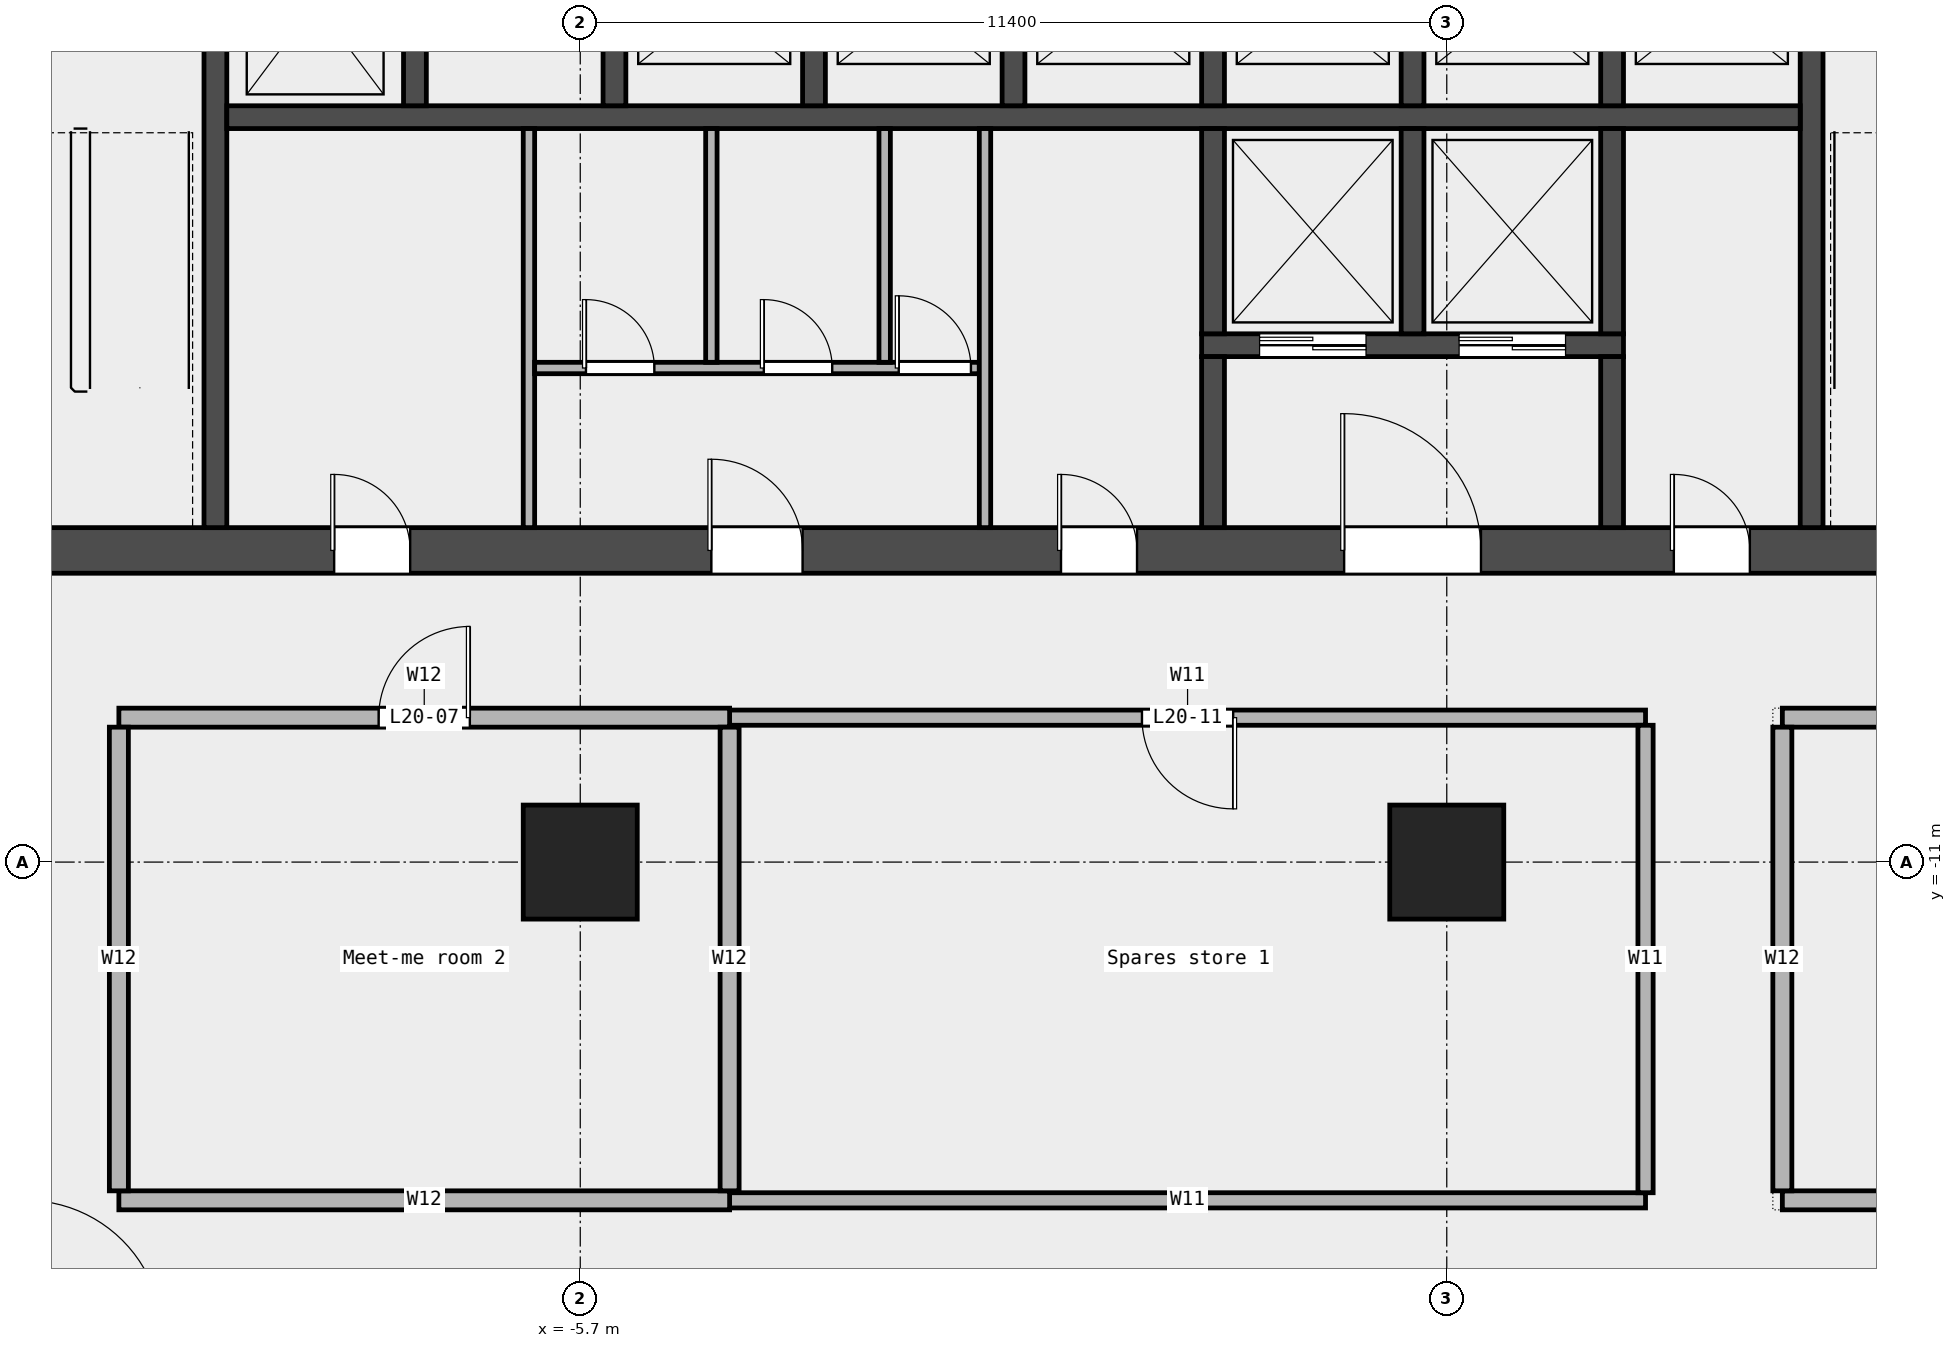
"""IFC4 building model, lengths in metres.
Left out: names, types, materials, properties, quantities, classifications, styles, units other than length and angle.
Written with IfcOpenShell. Run it as: python <this file> out.ifc"""

import sys

from ifc_helpers import new_model, si_unit, direction, frame, frame_2d, origin, origin_2d, place, context, subcontext, project, spatial, rectangle, extrude, element, fill, save


model = new_model("IFC4")
c1 = context("Model", 3, precision=1e-05, world=origin(), true_north=direction((0.0, 1.0)))
c2 = subcontext(c1, "Body", "Model", "MODEL_VIEW")
j1 = project(units=[si_unit("LENGTHUNIT", "METRE"), si_unit("PLANEANGLEUNIT", "RADIAN")], contexts=[c1])
p1 = place(None, origin())
s1 = spatial("IfcSite", under=j1, at=p1, CompositionType="ELEMENT")
p2 = place(p1, origin())
s2 = spatial("IfcBuilding", under=s1, at=p2, CompositionType="ELEMENT")
p3 = place(p2, frame((0.0, 0.0, 103.6)))
s3 = spatial("IfcBuildingStorey", under=s2, at=p3, CompositionType="ELEMENT", Elevation=103.6)
for number, where, z_axis, x_axis in (
    (1, (-5.7, -11.0, 0.0), (0.0, 0.0, 1.0), (1.0, 0.0, 0.0)),
    (2, (5.7, -11.0, 0.0), (0.0, 0.0, 1.0), (1.0, 0.0, 0.0)),
):
    element("IfcColumn", number, at=place(p3, frame(where, z_axis=z_axis, x_axis=x_axis)), inside=s3, PredefinedType="COLUMN", context=c2, shape_type="SweptSolid", body=[
        extrude(rectangle(XDim=1.5, YDim=1.5, at=origin_2d()), origin(), (0.0, 0.0, 1.0), 4.05),
    ])
p4 = place(p3, frame((-3.735, -15.45, 0.0), z_axis=(0.0, 0.0, 1.0), x_axis=(1.0, 0.0, 0.0)))
e3 = element("IfcWall", 3, at=p4, inside=s3, PredefinedType="PARTITIONING", context=c2, shape_type="SweptSolid", body=[
    extrude(rectangle(XDim=12.05, YDim=0.2, at=frame_2d((6.025, 0.0))), origin(), (0.0, 0.0, 1.0), 4.05),
])
p5 = place(p3, frame((-11.77, -15.45, 0.0), z_axis=(0.0, 0.0, 1.0), x_axis=(1.0, 0.0, 0.0)))
e4 = element("IfcWall", 4, at=p5, inside=s3, PredefinedType="PARTITIONING", context=c2, shape_type="SweptSolid", body=[
    extrude(rectangle(XDim=8.035, YDim=0.25, at=frame_2d((4.018, 0.0))), origin(), (0.0, 0.0, 1.0), 4.05),
])
p6 = place(p3, frame((10.115, -15.45, 0.0), z_axis=(0.0, 0.0, 1.0), x_axis=(1.0, 0.0, 0.0)))
e5 = element("IfcWall", 5, at=p6, inside=s3, PredefinedType="PARTITIONING", context=c2, shape_type="SweptSolid", body=[
    extrude(rectangle(XDim=18.885, YDim=0.25, at=frame_2d((9.442, 0.0))), origin(), (0.0, 0.0, 1.0), 4.05),
])
p7 = place(p6, frame((8.742, 0.0, 0.0)))
e6 = element("IfcOpeningElement", 6, at=p7, cuts=e5, PredefinedType="OPENING", context=c2, shape_type="SweptSolid", body=[
    extrude(rectangle(XDim=1.2, YDim=2.1, at=frame_2d((0.6, 1.05))), frame((0.0, 0.137, 0.0), z_axis=(0.0, -1.0, 0.0), x_axis=(1.0, 0.0, 0.0)), (0.0, 0.0, 1.0), 0.274),
])
p8 = place(p3, frame((-3.735, -9.1, 0.0), z_axis=(0.0, 0.0, 1.0), x_axis=(1.0, 0.0, 0.0)))
e7 = element("IfcWall", 7, at=p8, inside=s3, PredefinedType="PARTITIONING", context=c2, shape_type="SweptSolid", body=[
    extrude(rectangle(XDim=12.05, YDim=0.2, at=frame_2d((6.025, 0.0))), origin(), (0.0, 0.0, 1.0), 4.05),
])
p9 = place(p8, frame((5.425, 0.0, 0.0)))
e8 = element("IfcOpeningElement", 8, at=p9, cuts=e7, PredefinedType="OPENING", context=c2, shape_type="SweptSolid", body=[
    extrude(rectangle(XDim=1.2, YDim=2.1, at=frame_2d((0.6, 1.05))), frame((0.0, 0.112, 0.0), z_axis=(0.0, -1.0, 0.0), x_axis=(1.0, 0.0, 0.0)), (0.0, 0.0, 1.0), 0.224),
])
p10 = place(p3, frame((-11.77, -9.1, 0.0), z_axis=(0.0, 0.0, 1.0), x_axis=(1.0, 0.0, 0.0)))
e9 = element("IfcWall", 9, at=p10, inside=s3, PredefinedType="PARTITIONING", context=c2, shape_type="SweptSolid", body=[
    extrude(rectangle(XDim=8.035, YDim=0.25, at=frame_2d((4.018, 0.0))), origin(), (0.0, 0.0, 1.0), 4.05),
])
p11 = place(p10, frame((3.417, 0.0, 0.0)))
e10 = element("IfcOpeningElement", 10, at=p11, cuts=e9, PredefinedType="OPENING", context=c2, shape_type="SweptSolid", body=[
    extrude(rectangle(XDim=1.2, YDim=2.1, at=frame_2d((0.6, 1.05))), frame((0.0, 0.137, 0.0), z_axis=(0.0, -1.0, 0.0), x_axis=(1.0, 0.0, 0.0)), (0.0, 0.0, 1.0), 0.274),
])
p12 = place(p3, frame((10.115, -9.1, 0.0), z_axis=(0.0, 0.0, 1.0), x_axis=(1.0, 0.0, 0.0)))
e11 = element("IfcWall", 11, at=p12, inside=s3, PredefinedType="PARTITIONING", context=c2, shape_type="SweptSolid", body=[
    extrude(rectangle(XDim=18.885, YDim=0.25, at=frame_2d((9.442, 0.0))), origin(), (0.0, 0.0, 1.0), 4.05),
])
for number, where, z_axis, x_axis in (
    (12, (-11.77, -15.325, 0.0), (0.0, 0.0, 1.0), (0.0, 1.0, 0.0)),
    (13, (-3.735, -15.325, 0.0), (0.0, 0.0, 1.0), (0.0, 1.0, 0.0)),
):
    element("IfcWall", number, at=place(p3, frame(where, z_axis=z_axis, x_axis=x_axis)), inside=s3, PredefinedType="PARTITIONING", context=c2, shape_type="SweptSolid", body=[
        extrude(rectangle(XDim=6.1, YDim=0.25, at=frame_2d((3.05, 0.0))), origin(), (0.0, 0.0, 1.0), 4.05),
    ])
p13 = place(p3, frame((8.315, -15.35, 0.0), z_axis=(0.0, 0.0, 1.0), x_axis=(0.0, 1.0, 0.0)))
e14 = element("IfcWall", 14, at=p13, inside=s3, PredefinedType="PARTITIONING", context=c2, shape_type="SweptSolid", body=[
    extrude(rectangle(XDim=6.15, YDim=0.2, at=frame_2d((3.075, 0.0))), origin(), (0.0, 0.0, 1.0), 4.05),
])
p14 = place(p3, frame((10.115, -15.325, 0.0), z_axis=(0.0, 0.0, 1.0), x_axis=(0.0, 1.0, 0.0)))
e15 = element("IfcWall", 15, at=p14, inside=s3, PredefinedType="PARTITIONING", context=c2, shape_type="SweptSolid", body=[
    extrude(rectangle(XDim=6.1, YDim=0.25, at=frame_2d((3.05, 0.0))), origin(), (0.0, 0.0, 1.0), 4.05),
])
p15 = place(p3, frame((-14.4, -6.9, 0.0), z_axis=(0.0, 0.0, 1.0), x_axis=(1.0, 0.0, 0.0)))
e16 = element("IfcWall", 16, at=p15, inside=s3, PredefinedType="SHEAR", context=c2, shape_type="SweptSolid", body=[
    extrude(rectangle(XDim=28.8, YDim=0.6, at=frame_2d((14.4, 0.0))), origin(), (0.0, 0.0, 1.0), 4.2),
])
p16 = place(p15, frame((5.462, 0.0, 0.0)))
e17 = element("IfcOpeningElement", 17, at=p16, cuts=e16, PredefinedType="OPENING", context=c2, shape_type="SweptSolid", body=[
    extrude(rectangle(XDim=1.0, YDim=2.1, at=frame_2d((0.5, 1.05))), frame((0.0, 0.312, 0.0), z_axis=(0.0, -1.0, 0.0), x_axis=(1.0, 0.0, 0.0)), (0.0, 0.0, 1.0), 0.624),
])
p17 = place(p15, frame((10.425, 0.0, 0.0)))
e18 = element("IfcOpeningElement", 18, at=p17, cuts=e16, PredefinedType="OPENING", context=c2, shape_type="SweptSolid", body=[
    extrude(rectangle(XDim=1.2, YDim=2.1, at=frame_2d((0.6, 1.05))), frame((0.0, 0.312, 0.0), z_axis=(0.0, -1.0, 0.0), x_axis=(1.0, 0.0, 0.0)), (0.0, 0.0, 1.0), 0.624),
])
p18 = place(p15, frame((15.025, 0.0, 0.0)))
e19 = element("IfcOpeningElement", 19, at=p18, cuts=e16, PredefinedType="OPENING", context=c2, shape_type="SweptSolid", body=[
    extrude(rectangle(XDim=1.0, YDim=2.1, at=frame_2d((0.5, 1.05))), frame((0.0, 0.312, 0.0), z_axis=(0.0, -1.0, 0.0), x_axis=(1.0, 0.0, 0.0)), (0.0, 0.0, 1.0), 0.624),
])
p19 = place(p15, frame((18.75, 0.0, 0.0)))
e20 = element("IfcOpeningElement", 20, at=p19, cuts=e16, PredefinedType="OPENING", context=c2, shape_type="SweptSolid", body=[
    extrude(rectangle(XDim=1.8, YDim=2.1, at=frame_2d((0.9, 1.05))), frame((0.0, 0.312, 0.0), z_axis=(0.0, -1.0, 0.0), x_axis=(1.0, 0.0, 0.0)), (0.0, 0.0, 1.0), 0.624),
])
p20 = place(p15, frame((23.087, 0.0, 0.0)))
e21 = element("IfcOpeningElement", 21, at=p20, cuts=e16, PredefinedType="OPENING", context=c2, shape_type="SweptSolid", body=[
    extrude(rectangle(XDim=1.0, YDim=2.1, at=frame_2d((0.5, 1.05))), frame((0.0, 0.312, 0.0), z_axis=(0.0, -1.0, 0.0), x_axis=(1.0, 0.0, 0.0)), (0.0, 0.0, 1.0), 0.624),
])
for number, where, z_axis, x_axis in (
    (22, (-10.5, -6.6, 0.0), (0.0, 0.0, 1.0), (0.0, 1.0, 0.0)),
    (23, (10.5, -6.6, 0.0), (0.0, 0.0, 1.0), (0.0, 1.0, 0.0)),
):
    element("IfcWall", number, at=place(p3, frame(where, z_axis=z_axis, x_axis=x_axis)), inside=s3, PredefinedType="SHEAR", context=c2, shape_type="SweptSolid", body=[
        extrude(rectangle(XDim=8.55, YDim=0.3, at=frame_2d((4.275, 0.0))), origin(), (0.0, 0.0, 1.0), 4.2),
    ])
p21 = place(p3, frame((-10.35, -1.2, 0.0), z_axis=(0.0, 0.0, 1.0), x_axis=(1.0, 0.0, 0.0)))
e24 = element("IfcWall", 24, at=p21, inside=s3, PredefinedType="SOLIDWALL", context=c2, shape_type="SweptSolid", body=[
    extrude(rectangle(XDim=20.7, YDim=0.3, at=frame_2d((10.35, 0.0))), origin(), (0.0, 0.0, 1.0), 4.2),
])
for number, where, z_axis, x_axis in (
    (25, (-7.875, -1.05, 0.0), (0.0, 0.0, 1.0), (0.0, 1.0, 0.0)),
    (26, (-5.25, -1.05, 0.0), (0.0, 0.0, 1.0), (0.0, 1.0, 0.0)),
    (27, (-2.625, -1.05, 0.0), (0.0, 0.0, 1.0), (0.0, 1.0, 0.0)),
    (28, (0.0, -1.05, 0.0), (0.0, 0.0, 1.0), (0.0, 1.0, 0.0)),
    (29, (2.625, -1.05, 0.0), (0.0, 0.0, 1.0), (0.0, 1.0, 0.0)),
    (30, (5.25, -1.05, 0.0), (0.0, 0.0, 1.0), (0.0, 1.0, 0.0)),
    (31, (7.875, -1.05, 0.0), (0.0, 0.0, 1.0), (0.0, 1.0, 0.0)),
):
    element("IfcWall", number, at=place(p3, frame(where, z_axis=z_axis, x_axis=x_axis)), inside=s3, PredefinedType="SOLIDWALL", context=c2, shape_type="SweptSolid", body=[
        extrude(rectangle(XDim=2.7, YDim=0.3, at=frame_2d((1.35, 0.0))), origin(), (0.0, 0.0, 1.0), 4.2),
    ])
p22 = place(p3, frame((2.475, -4.2, 0.0), z_axis=(0.0, 0.0, 1.0), x_axis=(1.0, 0.0, 0.0)))
e32 = element("IfcWall", 32, at=p22, inside=s3, PredefinedType="SOLIDWALL", context=c2, shape_type="SweptSolid", body=[
    extrude(rectangle(XDim=5.55, YDim=0.3, at=frame_2d((2.775, 0.0))), origin(), (0.0, 0.0, 1.0), 4.2),
])
p23 = place(p22, frame((0.762, 0.0, 0.0)))
e33 = element("IfcOpeningElement", 33, at=p23, cuts=e32, PredefinedType="OPENING", context=c2, shape_type="SweptSolid", body=[
    extrude(rectangle(XDim=1.4, YDim=2.1, at=frame_2d((0.7, 1.05))), frame((0.0, 0.162, 0.0), z_axis=(0.0, -1.0, 0.0), x_axis=(1.0, 0.0, 0.0)), (0.0, 0.0, 1.0), 0.324),
])
p24 = place(p22, frame((3.387, 0.0, 0.0)))
e34 = element("IfcOpeningElement", 34, at=p24, cuts=e32, PredefinedType="OPENING", context=c2, shape_type="SweptSolid", body=[
    extrude(rectangle(XDim=1.4, YDim=2.1, at=frame_2d((0.7, 1.05))), frame((0.0, 0.162, 0.0), z_axis=(0.0, -1.0, 0.0), x_axis=(1.0, 0.0, 0.0)), (0.0, 0.0, 1.0), 0.324),
])
p25 = place(p3, frame((2.625, -4.05, 0.0), z_axis=(0.0, 0.0, 1.0), x_axis=(0.0, 1.0, 0.0)))
e35 = element("IfcWall", 35, at=p25, inside=s3, PredefinedType="SOLIDWALL", context=c2, shape_type="SweptSolid", body=[
    extrude(rectangle(XDim=2.7, YDim=0.3, at=frame_2d((1.35, 0.0))), origin(), (0.0, 0.0, 1.0), 4.2),
])
p26 = place(p3, frame((2.625, -6.6, 0.0), z_axis=(0.0, 0.0, 1.0), x_axis=(0.0, 1.0, 0.0)))
e36 = element("IfcWall", 36, at=p26, inside=s3, PredefinedType="SOLIDWALL", context=c2, shape_type="SweptSolid", body=[
    extrude(rectangle(XDim=2.25, YDim=0.3, at=frame_2d((1.125, 0.0))), origin(), (0.0, 0.0, 1.0), 4.2),
])
for number, where, z_axis, x_axis in (
    (37, (5.25, -4.05, 0.0), (0.0, 0.0, 1.0), (0.0, 1.0, 0.0)),
    (38, (7.875, -4.05, 0.0), (0.0, 0.0, 1.0), (0.0, 1.0, 0.0)),
):
    element("IfcWall", number, at=place(p3, frame(where, z_axis=z_axis, x_axis=x_axis)), inside=s3, PredefinedType="SOLIDWALL", context=c2, shape_type="SweptSolid", body=[
        extrude(rectangle(XDim=2.7, YDim=0.3, at=frame_2d((1.35, 0.0))), origin(), (0.0, 0.0, 1.0), 4.2),
    ])
p27 = place(p3, frame((7.875, -6.6, 0.0), z_axis=(0.0, 0.0, 1.0), x_axis=(0.0, 1.0, 0.0)))
e39 = element("IfcWall", 39, at=p27, inside=s3, PredefinedType="SOLIDWALL", context=c2, shape_type="SweptSolid", body=[
    extrude(rectangle(XDim=2.25, YDim=0.3, at=frame_2d((1.125, 0.0))), origin(), (0.0, 0.0, 1.0), 4.2),
])
p28 = place(p3, frame((-6.375, -6.6, 0.0), z_axis=(0.0, 0.0, 1.0), x_axis=(0.0, 1.0, 0.0)))
e40 = element("IfcWall", 40, at=p28, inside=s3, PredefinedType="PARTITIONING", context=c2, shape_type="SweptSolid", body=[
    extrude(rectangle(XDim=5.25, YDim=0.15, at=frame_2d((2.625, 0.0))), origin(), (0.0, 0.0, 1.0), 4.2),
])
p29 = place(p3, frame((-6.3, -4.5, 0.0), z_axis=(0.0, 0.0, 1.0), x_axis=(1.0, 0.0, 0.0)))
e41 = element("IfcWall", 41, at=p29, inside=s3, PredefinedType="PARTITIONING", context=c2, shape_type="SweptSolid", body=[
    extrude(rectangle(XDim=5.85, YDim=0.15, at=frame_2d((2.925, 0.0))), origin(), (0.0, 0.0, 1.0), 4.2),
])
p30 = place(p29, frame((0.675, 0.0, 0.0)))
e42 = element("IfcOpeningElement", 42, at=p30, cuts=e41, PredefinedType="OPENING", context=c2, shape_type="SweptSolid", body=[
    extrude(rectangle(XDim=0.9, YDim=2.1, at=frame_2d((0.45, 1.05))), frame((0.0, 0.087, 0.0), z_axis=(0.0, -1.0, 0.0), x_axis=(1.0, 0.0, 0.0)), (0.0, 0.0, 1.0), 0.174),
])
p31 = place(p29, frame((3.015, 0.0, 0.0)))
e43 = element("IfcOpeningElement", 43, at=p31, cuts=e41, PredefinedType="OPENING", context=c2, shape_type="SweptSolid", body=[
    extrude(rectangle(XDim=0.9, YDim=2.1, at=frame_2d((0.45, 1.05))), frame((0.0, 0.087, 0.0), z_axis=(0.0, -1.0, 0.0), x_axis=(1.0, 0.0, 0.0)), (0.0, 0.0, 1.0), 0.174),
])
p32 = place(p29, frame((4.79, 0.0, 0.0)))
e44 = element("IfcOpeningElement", 44, at=p32, cuts=e41, PredefinedType="OPENING", context=c2, shape_type="SweptSolid", body=[
    extrude(rectangle(XDim=0.95, YDim=2.1, at=frame_2d((0.475, 1.05))), frame((0.0, 0.087, 0.0), z_axis=(0.0, -1.0, 0.0), x_axis=(1.0, 0.0, 0.0)), (0.0, 0.0, 1.0), 0.174),
])
for number, where, z_axis, x_axis in (
    (45, (-3.975, -4.425, 0.0), (0.0, 0.0, 1.0), (0.0, 1.0, 0.0)),
    (46, (-1.695, -4.425, 0.0), (0.0, 0.0, 1.0), (0.0, 1.0, 0.0)),
):
    element("IfcWall", number, at=place(p3, frame(where, z_axis=z_axis, x_axis=x_axis)), inside=s3, PredefinedType="PARTITIONING", context=c2, shape_type="SweptSolid", body=[
        extrude(rectangle(XDim=3.075, YDim=0.15, at=frame_2d((1.538, 0.0))), origin(), (0.0, 0.0, 1.0), 4.2),
    ])
p33 = place(p3, frame((-0.375, -6.6, 0.0), z_axis=(0.0, 0.0, 1.0), x_axis=(0.0, 1.0, 0.0)))
e47 = element("IfcWall", 47, at=p33, inside=s3, PredefinedType="PARTITIONING", context=c2, shape_type="SweptSolid", body=[
    extrude(rectangle(XDim=5.25, YDim=0.15, at=frame_2d((2.625, 0.0))), origin(), (0.0, 0.0, 1.0), 4.2),
])
p34 = place(p11, origin())
e48 = element("IfcDoor", 48, at=p34, inside=s3, OperationType="SINGLE_SWING_RIGHT", PredefinedType="DOOR", context=c2, shape_type="SweptSolid", body=[
    extrude(rectangle(XDim=1.2, YDim=2.1, at=frame_2d((0.6, 1.05))), frame((0.0, 0.025, 0.0), z_axis=(0.0, -1.0, 0.0), x_axis=(1.0, 0.0, 0.0)), (0.0, 0.0, 1.0), 0.05),
])
fill(e10, e48)
p35 = place(p9, origin())
e49 = element("IfcDoor", 49, at=p35, inside=s3, OperationType="SINGLE_SWING_LEFT", PredefinedType="DOOR", context=c2, shape_type="SweptSolid", body=[
    extrude(rectangle(XDim=1.2, YDim=2.1, at=frame_2d((0.6, 1.05))), frame((0.0, 0.025, 0.0), z_axis=(0.0, -1.0, 0.0), x_axis=(1.0, 0.0, 0.0)), (0.0, 0.0, 1.0), 0.05),
])
fill(e8, e49)
p36 = place(p23, origin())
e50 = element("IfcDoor", 50, at=p36, inside=s3, OperationType="DOUBLE_DOOR_SLIDING", PredefinedType="DOOR", context=c2, shape_type="SweptSolid", body=[
    extrude(rectangle(XDim=1.4, YDim=2.1, at=frame_2d((0.7, 1.05))), frame((0.0, 0.025, 0.0), z_axis=(0.0, -1.0, 0.0), x_axis=(1.0, 0.0, 0.0)), (0.0, 0.0, 1.0), 0.05),
])
fill(e33, e50)
p37 = place(p24, origin())
e51 = element("IfcDoor", 51, at=p37, inside=s3, OperationType="DOUBLE_DOOR_SLIDING", PredefinedType="DOOR", context=c2, shape_type="SweptSolid", body=[
    extrude(rectangle(XDim=1.4, YDim=2.1, at=frame_2d((0.7, 1.05))), frame((0.0, 0.025, 0.0), z_axis=(0.0, -1.0, 0.0), x_axis=(1.0, 0.0, 0.0)), (0.0, 0.0, 1.0), 0.05),
])
fill(e34, e51)
p38 = place(p16, origin())
e52 = element("IfcDoor", 52, at=p38, inside=s3, OperationType="SINGLE_SWING_LEFT", PredefinedType="DOOR", context=c2, shape_type="SweptSolid", body=[
    extrude(rectangle(XDim=1.0, YDim=2.1, at=frame_2d((0.5, 1.05))), frame((0.0, 0.025, 0.0), z_axis=(0.0, -1.0, 0.0), x_axis=(1.0, 0.0, 0.0)), (0.0, 0.0, 1.0), 0.05),
])
fill(e17, e52)
p39 = place(p17, origin())
e53 = element("IfcDoor", 53, at=p39, inside=s3, OperationType="SINGLE_SWING_LEFT", PredefinedType="DOOR", context=c2, shape_type="SweptSolid", body=[
    extrude(rectangle(XDim=1.2, YDim=2.1, at=frame_2d((0.6, 1.05))), frame((0.0, 0.025, 0.0), z_axis=(0.0, -1.0, 0.0), x_axis=(1.0, 0.0, 0.0)), (0.0, 0.0, 1.0), 0.05),
])
fill(e18, e53)
p40 = place(p30, origin())
e54 = element("IfcDoor", 54, at=p40, inside=s3, OperationType="SINGLE_SWING_LEFT", PredefinedType="DOOR", context=c2, shape_type="SweptSolid", body=[
    extrude(rectangle(XDim=0.9, YDim=2.1, at=frame_2d((0.45, 1.05))), frame((0.0, 0.025, 0.0), z_axis=(0.0, -1.0, 0.0), x_axis=(1.0, 0.0, 0.0)), (0.0, 0.0, 1.0), 0.05),
])
fill(e42, e54)
p41 = place(p31, origin())
e55 = element("IfcDoor", 55, at=p41, inside=s3, OperationType="SINGLE_SWING_LEFT", PredefinedType="DOOR", context=c2, shape_type="SweptSolid", body=[
    extrude(rectangle(XDim=0.9, YDim=2.1, at=frame_2d((0.45, 1.05))), frame((0.0, 0.025, 0.0), z_axis=(0.0, -1.0, 0.0), x_axis=(1.0, 0.0, 0.0)), (0.0, 0.0, 1.0), 0.05),
])
fill(e43, e55)
p42 = place(p32, origin())
e56 = element("IfcDoor", 56, at=p42, inside=s3, OperationType="SINGLE_SWING_LEFT", PredefinedType="DOOR", context=c2, shape_type="SweptSolid", body=[
    extrude(rectangle(XDim=0.95, YDim=2.1, at=frame_2d((0.475, 1.05))), frame((0.0, 0.025, 0.0), z_axis=(0.0, -1.0, 0.0), x_axis=(1.0, 0.0, 0.0)), (0.0, 0.0, 1.0), 0.05),
])
fill(e44, e56)
p43 = place(p18, origin())
e57 = element("IfcDoor", 57, at=p43, inside=s3, OperationType="SINGLE_SWING_LEFT", PredefinedType="DOOR", context=c2, shape_type="SweptSolid", body=[
    extrude(rectangle(XDim=1.0, YDim=2.1, at=frame_2d((0.5, 1.05))), frame((0.0, 0.025, 0.0), z_axis=(0.0, -1.0, 0.0), x_axis=(1.0, 0.0, 0.0)), (0.0, 0.0, 1.0), 0.05),
])
fill(e19, e57)
p44 = place(p19, origin())
e58 = element("IfcDoor", 58, at=p44, inside=s3, OperationType="DOUBLE_DOOR_SINGLE_SWING", PredefinedType="DOOR", context=c2, shape_type="SweptSolid", body=[
    extrude(rectangle(XDim=1.8, YDim=2.1, at=frame_2d((0.9, 1.05))), frame((0.0, 0.025, 0.0), z_axis=(0.0, -1.0, 0.0), x_axis=(1.0, 0.0, 0.0)), (0.0, 0.0, 1.0), 0.05),
])
fill(e20, e58)
p45 = place(p20, origin())
e59 = element("IfcDoor", 59, at=p45, inside=s3, OperationType="SINGLE_SWING_LEFT", PredefinedType="DOOR", context=c2, shape_type="SweptSolid", body=[
    extrude(rectangle(XDim=1.0, YDim=2.1, at=frame_2d((0.5, 1.05))), frame((0.0, 0.025, 0.0), z_axis=(0.0, -1.0, 0.0), x_axis=(1.0, 0.0, 0.0)), (0.0, 0.0, 1.0), 0.05),
])
fill(e21, e59)
save(model, sys.argv[1])
